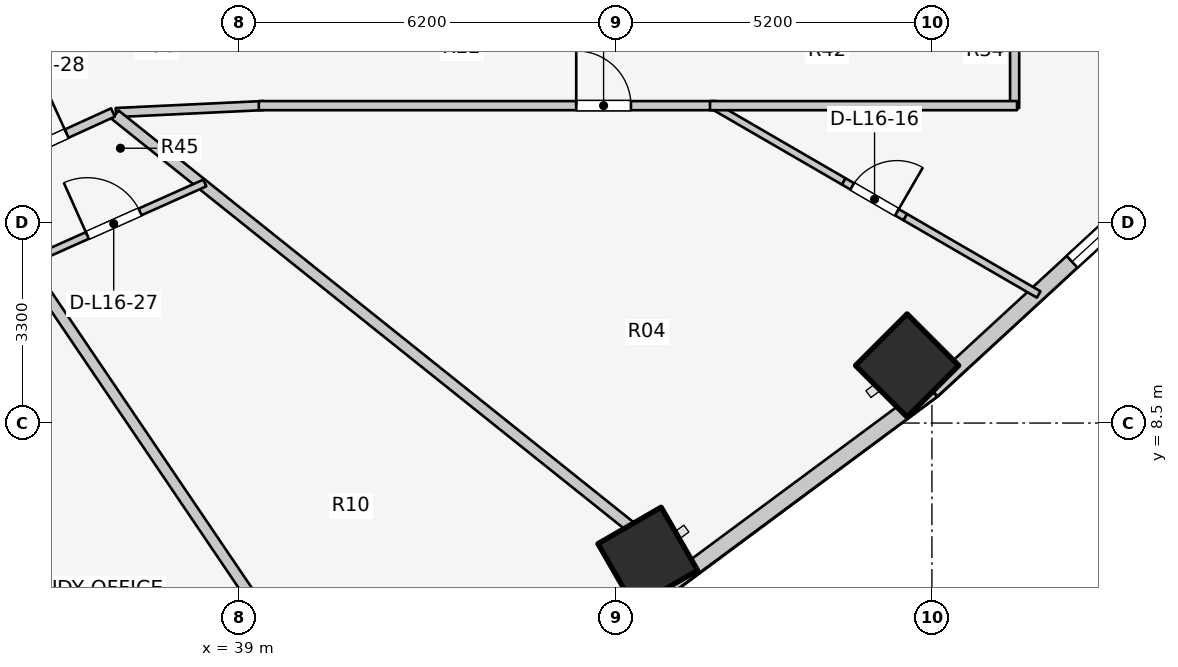
"""IFC4 building model, lengths in metres.
Left out: names, types, materials, properties, quantities, classifications, styles, units other than length and angle.
Written with IfcOpenShell. Run it as: python <this file> out.ifc"""

import sys

from ifc_helpers import new_model, si_unit, direction, frame, frame_2d, origin, origin_2d, place, context, subcontext, project, spatial, rectangle, extrude, element, fill, save


model = new_model("IFC4")
c1 = context("Model", 3, precision=1e-05, world=origin(), true_north=direction((0.0, 1.0)))
c2 = subcontext(c1, "Body", "Model", "MODEL_VIEW")
j1 = project(units=[si_unit("LENGTHUNIT", "METRE"), si_unit("PLANEANGLEUNIT", "RADIAN")], contexts=[c1])
p1 = place(None, origin())
s1 = spatial("IfcSite", under=j1, at=p1, CompositionType="ELEMENT")
p2 = place(p1, origin())
s2 = spatial("IfcBuilding", under=s1, at=p2, CompositionType="ELEMENT")
p3 = place(p2, frame((0.0, 0.0, 55.5)))
s3 = spatial("IfcBuildingStorey", under=s2, at=p3, CompositionType="ELEMENT", Elevation=55.5)
for number, where, z_axis, x_axis in (
    (1, (45.727, 6.296, 0.0), (0.0, 0.0, 1.0), (0.5, -0.866, 0.0)),
    (2, (49.992, 9.446, 0.0), (0.0, 0.0, 1.0), (0.707, -0.707, 0.0)),
):
    element("IfcColumn", number, at=place(p3, frame(where, z_axis=z_axis, x_axis=x_axis)), inside=s3, PredefinedType="COLUMN", context=c2, shape_type="SweptSolid", body=[
        extrude(rectangle(XDim=1.2, YDim=1.2, at=origin_2d()), origin(), (0.0, 0.0, 1.0), 3.1),
    ])
p4 = place(p3, frame((40.332, 3.364, 0.0), z_axis=(0.0, 0.0, 1.0), x_axis=(0.919612132394, 0.39282760335, 0.0)))
e3 = element("IfcWall", 3, at=p4, inside=s3, PredefinedType="STANDARD", context=c2, shape_type="SweptSolid", body=[
    extrude(rectangle(XDim=6.209, YDim=0.26, at=frame_2d((3.105, 0.0))), origin(), (0.0, 0.0, 1.0), 2.85),
])
p5 = place(p4, frame((2.355, 0.0, 0.75)))
e4 = element("IfcOpeningElement", 4, at=p5, cuts=e3, PredefinedType="OPENING", context=c2, shape_type="SweptSolid", body=[
    extrude(rectangle(XDim=1.5, YDim=1.6, at=frame_2d((0.75, 0.8))), frame((0.0, 0.14, 0.0), z_axis=(0.0, -1.0, 0.0), x_axis=(1.0, 0.0, 0.0)), (0.0, 0.0, 1.0), 0.28),
])
p6 = place(p3, frame((46.042, 5.803, 0.0), z_axis=(0.0, 0.0, 1.0), x_axis=(0.803477531792, 0.595335078679, 0.0)))
e5 = element("IfcWall", 5, at=p6, inside=s3, PredefinedType="STANDARD", context=c2, shape_type="SweptSolid", body=[
    extrude(rectangle(XDim=5.43, YDim=0.26, at=frame_2d((2.715, 0.0))), origin(), (0.0, 0.0, 1.0), 2.85),
])
p7 = place(p3, frame((50.405, 9.035, 0.0), z_axis=(0.0, 0.0, 1.0), x_axis=(0.735655109293, 0.67735630223, 0.0)))
e6 = element("IfcWall", 6, at=p7, inside=s3, PredefinedType="STANDARD", context=c2, shape_type="SweptSolid", body=[
    extrude(rectangle(XDim=5.151, YDim=0.26, at=frame_2d((2.575, 0.0))), origin(), (0.0, 0.0, 1.0), 2.85),
])
p8 = place(p7, frame((3.125, 0.0, 0.75)))
e7 = element("IfcOpeningElement", 7, at=p8, cuts=e6, PredefinedType="OPENING", context=c2, shape_type="SweptSolid", body=[
    extrude(rectangle(XDim=1.2, YDim=1.5, at=frame_2d((0.6, 0.75))), frame((0.0, 0.14, 0.0), z_axis=(0.0, -1.0, 0.0), x_axis=(1.0, 0.0, 0.0)), (0.0, 0.0, 1.0), 0.28),
])
p9 = place(p3, frame((34.127, 14.094, 0.0), z_axis=(0.0, 0.0, 1.0), x_axis=(0.906943449489, 0.421252393975, 0.0)))
e8 = element("IfcWall", 8, at=p9, inside=s3, PredefinedType="PARTITIONING", context=c2, shape_type="SweptSolid", body=[
    extrude(rectangle(XDim=2.186, YDim=0.15, at=frame_2d((1.093, 0.0))), origin(), (0.0, 0.0, 1.0), 2.237),
])
p10 = place(p3, frame((51.76, 13.68, 0.0), z_axis=(0.0, 0.0, 1.0), x_axis=(0.0, 1.0, 0.0)))
e9 = element("IfcWall", 9, at=p10, inside=s3, PredefinedType="PARTITIONING", context=c2, shape_type="SweptSolid", body=[
    extrude(rectangle(XDim=3.148, YDim=0.15, at=frame_2d((1.574, 0.0))), origin(), (0.0, 0.0, 1.0), 2.855),
])
p11 = place(p3, frame((46.757, 13.745, 0.0), z_axis=(0.0, 0.0, 1.0), x_axis=(0.865085506202, -0.501624428193, 0.0)))
e10 = element("IfcWall", 10, at=p11, inside=s3, PredefinedType="MOVABLE", context=c2, shape_type="SweptSolid", body=[
    extrude(rectangle(XDim=2.536, YDim=0.12, at=frame_2d((1.268, 0.0))), origin(), (0.0, 0.0, 1.0), 2.855),
])
p12 = place(p3, frame((48.95, 12.473, 0.0), z_axis=(0.0, 0.0, 1.0), x_axis=(0.865092761915, -0.501611915013, 0.0)))
e11 = element("IfcWall", 11, at=p12, inside=s3, PredefinedType="MOVABLE", context=c2, shape_type="SweptSolid", body=[
    extrude(rectangle(XDim=1.17, YDim=0.12, at=frame_2d((0.585, 0.0))), origin(), (0.0, 0.0, 1.0), 2.11),
])
p13 = place(p12, frame((0.16, 0.0, 0.0)))
e12 = element("IfcOpeningElement", 12, at=p13, cuts=e11, PredefinedType="OPENING", context=c2, shape_type="SweptSolid", body=[
    extrude(rectangle(XDim=0.85, YDim=2.05, at=frame_2d((0.425, 1.025))), frame((0.0, 0.07, 0.0), z_axis=(0.0, -1.0, 0.0), x_axis=(1.0, 0.0, 0.0)), (0.0, 0.0, 1.0), 0.14),
])
p14 = place(p3, frame((49.962, 11.886, 0.0), z_axis=(0.0, 0.0, 1.0), x_axis=(0.865085506202, -0.501624428193, 0.0)))
e13 = element("IfcWall", 13, at=p14, inside=s3, PredefinedType="MOVABLE", context=c2, shape_type="SweptSolid", body=[
    extrude(rectangle(XDim=2.536, YDim=0.12, at=frame_2d((1.268, 0.0))), origin(), (0.0, 0.0, 1.0), 2.855),
])
p15 = place(p3, frame((36.98, 13.606, 0.0), z_axis=(0.0, 0.0, 1.0), x_axis=(0.998877427952, 0.047369651964, 0.0)))
e14 = element("IfcWall", 14, at=p15, inside=s3, PredefinedType="PARTITIONING", context=c2, shape_type="SweptSolid", body=[
    extrude(rectangle(XDim=2.433, YDim=0.15, at=frame_2d((1.216, 0.0))), origin(), (0.0, 0.0, 1.0), 2.237),
])
p16 = place(p3, frame((39.33, 13.72, 0.0), z_axis=(0.0, 0.0, 1.0), x_axis=(1.0, 0.0, 0.0)))
e15 = element("IfcWall", 15, at=p16, inside=s3, PredefinedType="PARTITIONING", context=c2, shape_type="SweptSolid", body=[
    extrude(rectangle(XDim=7.52, YDim=0.15, at=frame_2d((3.76, 0.0))), origin(), (0.0, 0.0, 1.0), 2.237),
])
p17 = place(p16, frame((5.22, 0.0, 0.0)))
e16 = element("IfcOpeningElement", 16, at=p17, cuts=e15, PredefinedType="OPENING", context=c2, shape_type="SweptSolid", body=[
    extrude(rectangle(XDim=0.9, YDim=2.1, at=frame_2d((0.45, 1.05))), frame((0.0, 0.085, 0.0), z_axis=(0.0, -1.0, 0.0), x_axis=(1.0, 0.0, 0.0)), (0.0, 0.0, 1.0), 0.17),
])
p18 = place(p3, frame((46.75, 13.72, 0.0), z_axis=(0.0, 0.0, 1.0), x_axis=(1.0, 0.0, 0.0)))
e17 = element("IfcWall", 17, at=p18, inside=s3, PredefinedType="PARTITIONING", context=c2, shape_type="SweptSolid", body=[
    extrude(rectangle(XDim=5.05, YDim=0.15, at=frame_2d((2.525, 0.0))), origin(), (0.0, 0.0, 1.0), 2.069),
])
p19 = place(p3, frame((34.58, 12.474, 0.0), z_axis=(0.0, 0.0, 1.0), x_axis=(0.560641882674, -0.828058379217, 0.0)))
e18 = element("IfcWall", 18, at=p19, inside=s3, PredefinedType="PARTITIONING", context=c2, shape_type="SweptSolid", body=[
    extrude(rectangle(XDim=9.658, YDim=0.18, at=frame_2d((4.829, 0.0))), origin(), (0.0, 0.0, 1.0), 2.237),
])
p20 = place(p3, frame((36.968, 13.569, 0.0), z_axis=(0.0, 0.0, 1.0), x_axis=(0.781055486744, -0.624461629428, 0.0)))
e19 = element("IfcWall", 19, at=p20, inside=s3, PredefinedType="PARTITIONING", context=c2, shape_type="SweptSolid", body=[
    extrude(rectangle(XDim=10.843, YDim=0.18, at=frame_2d((5.422, 0.0))), origin(), (0.0, 0.0, 1.0), 2.237),
])
p21 = place(p3, frame((35.445, 11.109, 0.0), z_axis=(0.0, 0.0, 1.0), x_axis=(0.913036999281, 0.407876743569, 0.0)))
e20 = element("IfcWall", 20, at=p21, inside=s3, PredefinedType="MOVABLE", context=c2, shape_type="SweptSolid", body=[
    extrude(rectangle(XDim=3.282, YDim=0.12, at=frame_2d((1.641, 0.0))), origin(), (0.0, 0.0, 1.0), 2.237),
])
p22 = place(p21, frame((1.166, 0.0, 0.0)))
e21 = element("IfcOpeningElement", 21, at=p22, cuts=e20, PredefinedType="OPENING", context=c2, shape_type="SweptSolid", body=[
    extrude(rectangle(XDim=0.95, YDim=2.1, at=frame_2d((0.475, 1.05))), frame((0.0, 0.07, 0.0), z_axis=(0.0, -1.0, 0.0), x_axis=(1.0, 0.0, 0.0)), (0.0, 0.0, 1.0), 0.14),
])
p23 = place(p3, frame((34.543, 12.518, 0.0), z_axis=(0.0, 0.0, 1.0), x_axis=(0.909747571199, 0.415161843982, 0.0)))
e22 = element("IfcWall", 22, at=p23, inside=s3, PredefinedType="PARTITIONING", context=c2, shape_type="SweptSolid", body=[
    extrude(rectangle(XDim=2.625, YDim=0.15, at=frame_2d((1.312, 0.0))), origin(), (0.0, 0.0, 1.0), 2.237),
])
p24 = place(p23, frame((0.838, 0.0, 0.0)))
e23 = element("IfcOpeningElement", 23, at=p24, cuts=e22, PredefinedType="OPENING", context=c2, shape_type="SweptSolid", body=[
    extrude(rectangle(XDim=0.95, YDim=2.1, at=frame_2d((0.475, 1.05))), frame((0.0, 0.085, 0.0), z_axis=(0.0, -1.0, 0.0), x_axis=(1.0, 0.0, 0.0)), (0.0, 0.0, 1.0), 0.17),
])
p25 = place(p8, origin())
e24 = element("IfcWindow", 24, at=p25, inside=s3, PartitioningType="SINGLE_PANEL", PredefinedType="WINDOW", context=c2, shape_type="SweptSolid", body=[
    extrude(rectangle(XDim=1.2, YDim=1.5, at=frame_2d((0.6, 0.75))), frame((0.0, 0.03, 0.0), z_axis=(0.0, -1.0, 0.0), x_axis=(1.0, 0.0, 0.0)), (0.0, 0.0, 1.0), 0.06),
])
fill(e7, e24)
p26 = place(p13, origin())
e25 = element("IfcDoor", 25, at=p26, inside=s3, OperationType="SINGLE_SWING_RIGHT", PredefinedType="DOOR", context=c2, shape_type="SweptSolid", body=[
    extrude(rectangle(XDim=0.85, YDim=2.05, at=frame_2d((0.425, 1.025))), frame((0.0, 0.025, 0.0), z_axis=(0.0, -1.0, 0.0), x_axis=(1.0, 0.0, 0.0)), (0.0, 0.0, 1.0), 0.05),
])
fill(e12, e25)
p27 = place(p17, origin())
e26 = element("IfcDoor", 26, at=p27, inside=s3, OperationType="SINGLE_SWING_LEFT", PredefinedType="DOOR", context=c2, shape_type="SweptSolid", body=[
    extrude(rectangle(XDim=0.9, YDim=2.1, at=frame_2d((0.45, 1.05))), frame((0.0, 0.025, 0.0), z_axis=(0.0, -1.0, 0.0), x_axis=(1.0, 0.0, 0.0)), (0.0, 0.0, 1.0), 0.05),
])
fill(e16, e26)
p28 = place(p22, origin())
e27 = element("IfcDoor", 27, at=p28, inside=s3, OperationType="SINGLE_SWING_LEFT", PredefinedType="DOOR", context=c2, shape_type="SweptSolid", body=[
    extrude(rectangle(XDim=0.95, YDim=2.1, at=frame_2d((0.475, 1.05))), frame((0.0, 0.025, 0.0), z_axis=(0.0, -1.0, 0.0), x_axis=(1.0, 0.0, 0.0)), (0.0, 0.0, 1.0), 0.05),
])
fill(e21, e27)
p29 = place(p24, origin())
e28 = element("IfcDoor", 28, at=p29, inside=s3, OperationType="SINGLE_SWING_RIGHT", PredefinedType="DOOR", context=c2, shape_type="SweptSolid", body=[
    extrude(rectangle(XDim=0.95, YDim=2.1, at=frame_2d((0.475, 1.05))), frame((0.0, 0.025, 0.0), z_axis=(0.0, -1.0, 0.0), x_axis=(1.0, 0.0, 0.0)), (0.0, 0.0, 1.0), 0.05),
])
fill(e23, e28)
save(model, sys.argv[1])
